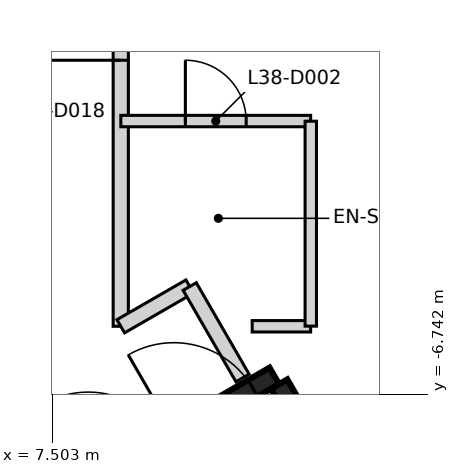
"""IFC4 building model, lengths in metres.
Left out: names, types, materials, properties, quantities, classifications, styles, units other than length and angle.
Written with IfcOpenShell. Run it as: python <this file> out.ifc"""

import sys

from ifc_helpers import new_model, si_unit, direction, frame, frame_2d, origin, place, context, subcontext, project, spatial, rectangle, extrude, element, fill, save


model = new_model("IFC4")
c1 = context("Model", 3, precision=1e-05, world=origin(), true_north=direction((0.0, 1.0)))
c2 = subcontext(c1, "Body", "Model", "MODEL_VIEW")
j1 = project(units=[si_unit("LENGTHUNIT", "METRE"), si_unit("PLANEANGLEUNIT", "RADIAN")], contexts=[c1])
p1 = place(None, origin())
s1 = spatial("IfcSite", under=j1, at=p1, CompositionType="ELEMENT")
p2 = place(p1, origin())
s2 = spatial("IfcBuilding", under=s1, at=p2, CompositionType="ELEMENT")
p3 = place(p2, frame((0.0, 0.0, 154.0)))
s3 = spatial("IfcBuildingStorey", under=s2, at=p3, CompositionType="ELEMENT", Elevation=154.0)
p4 = place(p3, frame((0.417, -12.273, 0.0), z_axis=(0.0, 0.0, 1.0), x_axis=(0.866021906294, 0.500006057782, 0.0)))
e1 = element("IfcWall", 1, at=p4, inside=s3, PredefinedType="SHEAR", context=c2, shape_type="SweptSolid", body=[
    extrude(rectangle(XDim=11.55, YDim=0.25, at=frame_2d((5.775, 0.0))), origin(), (0.0, 0.0, 1.0), 3.2),
])
p5 = place(p4, frame((10.025, 0.0, 0.0)))
e2 = element("IfcOpeningElement", 2, at=p5, cuts=e1, PredefinedType="OPENING", context=c2, shape_type="SweptSolid", body=[
    extrude(rectangle(XDim=1.2, YDim=2.1, at=frame_2d((0.6, 1.05))), frame((0.0, 0.135, 0.0), z_axis=(0.0, -1.0, 0.0), x_axis=(1.0, 0.0, 0.0)), (0.0, 0.0, 1.0), 0.27),
])
p6 = place(p4, frame((8.725, 0.0, 0.0)))
e3 = element("IfcOpeningElement", 3, at=p6, cuts=e1, PredefinedType="OPENING", context=c2, shape_type="SweptSolid", body=[
    extrude(rectangle(XDim=1.2, YDim=2.1, at=frame_2d((0.6, 1.05))), frame((0.0, 0.135, 0.0), z_axis=(0.0, -1.0, 0.0), x_axis=(1.0, 0.0, 0.0)), (0.0, 0.0, 1.0), 0.27),
])
p7 = place(p3, frame((10.483, -6.606, 0.0), z_axis=(0.0, 0.0, 1.0), x_axis=(0.49999885962, -0.866026062182, 0.0)))
e4 = element("IfcWall", 4, at=p7, inside=s3, PredefinedType="SHEAR", context=c2, shape_type="SweptSolid", body=[
    extrude(rectangle(XDim=5.225, YDim=0.25, at=frame_2d((2.612, 0.0))), origin(), (0.0, 0.0, 1.0), 3.2),
])
p8 = place(p3, frame((8.4, -5.845, 0.0), z_axis=(0.0, 0.0, 1.0), x_axis=(0.0, 1.0, 0.0)))
e5 = element("IfcWall", 5, at=p8, inside=s3, PredefinedType="PARTITIONING", context=c2, shape_type="SweptSolid", body=[
    extrude(rectangle(XDim=9.923, YDim=0.2, at=frame_2d((4.961, 0.0))), origin(), (0.0, 0.0, 1.0), 3.2),
])
p9 = place(p8, frame((3.5, 0.0, 0.0)))
e6 = element("IfcOpeningElement", 6, at=p9, cuts=e5, PredefinedType="OPENING", context=c2, shape_type="SweptSolid", body=[
    extrude(rectangle(XDim=0.95, YDim=2.1, at=frame_2d((0.475, 1.05))), frame((0.0, 0.11, 0.0), z_axis=(0.0, -1.0, 0.0), x_axis=(1.0, 0.0, 0.0)), (0.0, 0.0, 1.0), 0.22),
])
p10 = place(p8, frame((6.023, 0.0, 0.0)))
e7 = element("IfcOpeningElement", 7, at=p10, cuts=e5, PredefinedType="OPENING", context=c2, shape_type="SweptSolid", body=[
    extrude(rectangle(XDim=0.95, YDim=2.1, at=frame_2d((0.475, 1.05))), frame((0.0, 0.11, 0.0), z_axis=(0.0, -1.0, 0.0), x_axis=(1.0, 0.0, 0.0)), (0.0, 0.0, 1.0), 0.22),
])
p11 = place(p3, frame((8.4, -5.845, 0.0), z_axis=(0.0, 0.0, 1.0), x_axis=(0.866313671633, 0.499500372715, 0.0)))
e8 = element("IfcWall", 8, at=p11, inside=s3, PredefinedType="PARTITIONING", context=c2, shape_type="SweptSolid", body=[
    extrude(rectangle(XDim=1.047, YDim=0.2, at=frame_2d((0.523, 0.0))), origin(), (0.0, 0.0, 1.0), 3.2),
])
p12 = place(p3, frame((9.307, -5.322, 0.0), z_axis=(0.0, 0.0, 1.0), x_axis=(0.499955621637, -0.866051024128, 0.0)))
e9 = element("IfcWall", 9, at=p12, inside=s3, PredefinedType="PARTITIONING", context=c2, shape_type="SweptSolid", body=[
    extrude(rectangle(XDim=1.39, YDim=0.2, at=frame_2d((0.695, 0.0))), origin(), (0.0, 0.0, 1.0), 3.2),
])
p13 = place(p3, frame((8.401, -3.145, 0.0), z_axis=(0.0, 0.0, 1.0), x_axis=(1.0, 0.0, 0.0)))
e10 = element("IfcWall", 10, at=p13, inside=s3, PredefinedType="PARTITIONING", context=c2, shape_type="SweptSolid", body=[
    extrude(rectangle(XDim=2.497, YDim=0.15, at=frame_2d((1.249, 0.0))), origin(), (0.0, 0.0, 1.0), 3.2),
])
p14 = place(p13, frame((0.849, 0.0, 0.0)))
e11 = element("IfcOpeningElement", 11, at=p14, cuts=e10, PredefinedType="OPENING", context=c2, shape_type="SweptSolid", body=[
    extrude(rectangle(XDim=0.8, YDim=2.1, at=frame_2d((0.4, 1.05))), frame((0.0, 0.085, 0.0), z_axis=(0.0, -1.0, 0.0), x_axis=(1.0, 0.0, 0.0)), (0.0, 0.0, 1.0), 0.17),
])
p15 = place(p3, frame((10.898, -5.845, 0.0), z_axis=(0.0, 0.0, 1.0), x_axis=(-1.0, 0.0, 0.0)))
e12 = element("IfcWall", 12, at=p15, inside=s3, PredefinedType="PARTITIONING", context=c2, shape_type="SweptSolid", body=[
    extrude(rectangle(XDim=0.769, YDim=0.15, at=frame_2d((0.384, 0.0))), origin(), (0.0, 0.0, 1.0), 3.2),
])
p16 = place(p3, frame((10.9, -5.843, 0.0), z_axis=(0.0, 0.0, 1.0), x_axis=(0.0, 1.0, 0.0)))
e13 = element("IfcWall", 13, at=p16, inside=s3, PredefinedType="PARTITIONING", context=c2, shape_type="SweptSolid", body=[
    extrude(rectangle(XDim=2.696, YDim=0.15, at=frame_2d((1.348, 0.0))), origin(), (0.0, 0.0, 1.0), 3.2),
])
p17 = place(p5, origin())
e14 = element("IfcDoor", 14, at=p17, inside=s3, OperationType="SINGLE_SWING_LEFT", PredefinedType="DOOR", context=c2, shape_type="SweptSolid", body=[
    extrude(rectangle(XDim=1.2, YDim=2.1, at=frame_2d((0.6, 1.05))), frame((0.0, 0.025, 0.0), z_axis=(0.0, -1.0, 0.0), x_axis=(1.0, 0.0, 0.0)), (0.0, 0.0, 1.0), 0.05),
])
fill(e2, e14)
p18 = place(p9, frame((0.95, 0.0, 0.0), z_axis=(0.0, 0.0, 1.0), x_axis=(-1.0, 0.0, 0.0)))
e15 = element("IfcDoor", 15, at=p18, inside=s3, OperationType="SINGLE_SWING_LEFT", PredefinedType="DOOR", context=c2, shape_type="SweptSolid", body=[
    extrude(rectangle(XDim=0.95, YDim=2.1, at=frame_2d((0.475, 1.05))), frame((0.0, 0.025, 0.0), z_axis=(0.0, -1.0, 0.0), x_axis=(1.0, 0.0, 0.0)), (0.0, 0.0, 1.0), 0.05),
])
fill(e6, e15)
p19 = place(p14, frame((0.8, 0.0, 0.0), z_axis=(0.0, 0.0, 1.0), x_axis=(-1.0, 0.0, 0.0)))
e16 = element("IfcDoor", 16, at=p19, inside=s3, OperationType="SINGLE_SWING_LEFT", PredefinedType="DOOR", context=c2, shape_type="SweptSolid", body=[
    extrude(rectangle(XDim=0.8, YDim=2.1, at=frame_2d((0.4, 1.05))), frame((0.0, 0.025, 0.0), z_axis=(0.0, -1.0, 0.0), x_axis=(1.0, 0.0, 0.0)), (0.0, 0.0, 1.0), 0.05),
])
fill(e11, e16)
save(model, sys.argv[1])
